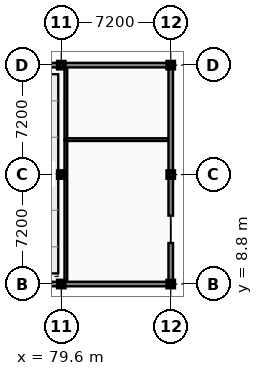
"""IFC4 building model, lengths in metres.
Left out: names, types, materials, properties, quantities, classifications, styles, units other than length and angle.
Written with IfcOpenShell. Run it as: python <this file> out.ifc"""

import sys

from ifc_helpers import new_model, si_unit, direction, frame, frame_2d, origin, origin_2d, place, context, subcontext, project, spatial, rectangle, extrude, element, fill, save


model = new_model("IFC4")
c1 = context("Model", 3, precision=1e-05, world=origin(), true_north=direction((0.0, 1.0)))
c2 = subcontext(c1, "Body", "Model", "MODEL_VIEW")
j1 = project(units=[si_unit("LENGTHUNIT", "METRE"), si_unit("PLANEANGLEUNIT", "RADIAN")], contexts=[c1])
p1 = place(None, origin())
s1 = spatial("IfcSite", under=j1, at=p1, CompositionType="ELEMENT")
p2 = place(p1, origin())
s2 = spatial("IfcBuilding", under=s1, at=p2, CompositionType="ELEMENT")
p3 = place(p2, frame((0.0, 0.0, 9.6)))
s3 = spatial("IfcBuildingStorey", under=s2, at=p3, CompositionType="ELEMENT", Elevation=9.6)
for number, where, z_axis, x_axis in (
    (1, (79.6, 8.8, 0.0), (0.0, 0.0, 1.0), (1.0, 0.0, 0.0)),
    (2, (79.6, 16.0, 0.0), (0.0, 0.0, 1.0), (1.0, 0.0, 0.0)),
    (3, (79.6, 23.2, 0.0), (0.0, 0.0, 1.0), (1.0, 0.0, 0.0)),
    (4, (86.8, 8.8, 0.0), (0.0, 0.0, 1.0), (1.0, 0.0, 0.0)),
    (5, (86.8, 16.0, 0.0), (0.0, 0.0, 1.0), (1.0, 0.0, 0.0)),
    (6, (86.8, 23.2, 0.0), (0.0, 0.0, 1.0), (1.0, 0.0, 0.0)),
):
    element("IfcColumn", number, at=place(p3, frame(where, z_axis=z_axis, x_axis=x_axis)), inside=s3, PredefinedType="COLUMN", context=c2, shape_type="SweptSolid", body=[
        extrude(rectangle(XDim=0.4, YDim=0.4, at=origin_2d()), origin(), (0.0, 0.0, 1.0), 4.2),
    ])
p4 = place(p3, frame((79.9, 8.96, 0.0), z_axis=(0.0, 0.0, 1.0), x_axis=(0.0, 1.0, 0.0)))
e7 = element("IfcWall", 7, at=p4, inside=s3, PredefinedType="PARTITIONING", context=c2, shape_type="SweptSolid", body=[
    extrude(rectangle(XDim=9.34, YDim=0.18, at=frame_2d((4.67, 0.0))), origin(), (0.0, 0.0, 1.0), 3.33),
])
p5 = place(p4, frame((4.17, 0.0, -0.01)))
e8 = element("IfcOpeningElement", 8, at=p5, cuts=e7, PredefinedType="OPENING", context=c2, shape_type="SweptSolid", body=[
    extrude(rectangle(XDim=1.0, YDim=2.16, at=frame_2d((0.5, 1.08))), frame((0.0, 0.1, 0.0), z_axis=(0.0, -1.0, 0.0), x_axis=(1.0, 0.0, 0.0)), (0.0, 0.0, 1.0), 0.2),
])
p6 = place(p3, frame((79.9, 18.3, 0.0), z_axis=(0.0, 0.0, 1.0), x_axis=(0.0, 1.0, 0.0)))
e9 = element("IfcWall", 9, at=p6, inside=s3, PredefinedType="PARTITIONING", context=c2, shape_type="SweptSolid", body=[
    extrude(rectangle(XDim=4.76, YDim=0.18, at=frame_2d((2.38, 0.0))), origin(), (0.0, 0.0, 1.0), 3.33),
])
p7 = place(p6, frame((1.88, 0.0, -0.01)))
e10 = element("IfcOpeningElement", 10, at=p7, cuts=e9, PredefinedType="OPENING", context=c2, shape_type="SweptSolid", body=[
    extrude(rectangle(XDim=1.0, YDim=2.16, at=frame_2d((0.5, 1.08))), frame((0.0, 0.1, 0.0), z_axis=(0.0, -1.0, 0.0), x_axis=(1.0, 0.0, 0.0)), (0.0, 0.0, 1.0), 0.2),
])
p8 = place(p3, frame((79.9, 18.3, 0.0), z_axis=(0.0, 0.0, 1.0), x_axis=(1.0, 0.0, 0.0)))
e11 = element("IfcWall", 11, at=p8, inside=s3, PredefinedType="PARTITIONING", context=c2, shape_type="SweptSolid", body=[
    extrude(rectangle(XDim=6.76, YDim=0.18, at=frame_2d((3.38, 0.0))), origin(), (0.0, 0.0, 1.0), 3.41),
])
p9 = place(p3, frame((76.9, 8.8, 0.0), z_axis=(0.0, 0.0, 1.0), x_axis=(1.0, 0.0, 0.0)))
e12 = element("IfcWall", 12, at=p9, inside=s3, PredefinedType="SOLIDWALL", context=c2, shape_type="SweptSolid", body=[
    extrude(rectangle(XDim=2.7, YDim=0.3, at=frame_2d((1.35, 0.0))), origin(), (0.0, 0.0, 1.0), 3.33),
])
p10 = place(p3, frame((79.6, 8.8, 0.0), z_axis=(0.0, 0.0, 1.0), x_axis=(1.0, 0.0, 0.0)))
e13 = element("IfcWall", 13, at=p10, inside=s3, PredefinedType="SOLIDWALL", context=c2, shape_type="SweptSolid", body=[
    extrude(rectangle(XDim=7.2, YDim=0.3, at=frame_2d((3.6, 0.0))), origin(), (0.0, 0.0, 1.0), 3.33),
])
p11 = place(p10, frame((0.66, 0.0, 0.85)))
e14 = element("IfcOpeningElement", 14, at=p11, cuts=e13, PredefinedType="OPENING", context=c2, shape_type="SweptSolid", body=[
    extrude(rectangle(XDim=0.9, YDim=2.1, at=frame_2d((0.45, 1.05))), frame((0.0, 0.16, 0.0), z_axis=(0.0, -1.0, 0.0), x_axis=(1.0, 0.0, 0.0)), (0.0, 0.0, 1.0), 0.32),
])
p12 = place(p10, frame((5.66, 0.0, 0.85)))
e15 = element("IfcOpeningElement", 15, at=p12, cuts=e13, PredefinedType="OPENING", context=c2, shape_type="SweptSolid", body=[
    extrude(rectangle(XDim=0.9, YDim=2.1, at=frame_2d((0.45, 1.05))), frame((0.0, 0.16, 0.0), z_axis=(0.0, -1.0, 0.0), x_axis=(1.0, 0.0, 0.0)), (0.0, 0.0, 1.0), 0.32),
])
p13 = place(p3, frame((79.6, 23.2, 0.0), z_axis=(0.0, 0.0, 1.0), x_axis=(-1.0, 0.0, 0.0)))
e16 = element("IfcWall", 16, at=p13, inside=s3, PredefinedType="SOLIDWALL", context=c2, shape_type="SweptSolid", body=[
    extrude(rectangle(XDim=2.7, YDim=0.3, at=frame_2d((1.35, 0.0))), origin(), (0.0, 0.0, 1.0), 3.33),
])
p14 = place(p3, frame((86.8, 23.2, 0.0), z_axis=(0.0, 0.0, 1.0), x_axis=(-1.0, 0.0, 0.0)))
e17 = element("IfcWall", 17, at=p14, inside=s3, PredefinedType="SOLIDWALL", context=c2, shape_type="SweptSolid", body=[
    extrude(rectangle(XDim=7.2, YDim=0.3, at=frame_2d((3.6, 0.0))), origin(), (0.0, 0.0, 1.0), 3.33),
])
p15 = place(p14, frame((0.46, 0.0, 0.85)))
e18 = element("IfcOpeningElement", 18, at=p15, cuts=e17, PredefinedType="OPENING", context=c2, shape_type="SweptSolid", body=[
    extrude(rectangle(XDim=0.9, YDim=2.1, at=frame_2d((0.45, 1.05))), frame((0.0, 0.16, 0.0), z_axis=(0.0, -1.0, 0.0), x_axis=(1.0, 0.0, 0.0)), (0.0, 0.0, 1.0), 0.32),
])
p16 = place(p14, frame((5.66, 0.0, 0.85)))
e19 = element("IfcOpeningElement", 19, at=p16, cuts=e17, PredefinedType="OPENING", context=c2, shape_type="SweptSolid", body=[
    extrude(rectangle(XDim=0.9, YDim=2.1, at=frame_2d((0.45, 1.05))), frame((0.0, 0.16, 0.0), z_axis=(0.0, -1.0, 0.0), x_axis=(1.0, 0.0, 0.0)), (0.0, 0.0, 1.0), 0.32),
])
for number, where, z_axis, x_axis in (
    (20, (86.8, 8.8, 0.0), (0.0, 0.0, 1.0), (0.0, 1.0, 0.0)),
    (21, (86.8, 13.3, 0.0), (0.0, 0.0, 1.0), (0.0, 1.0, 0.0)),
):
    element("IfcWall", number, at=place(p3, frame(where, z_axis=z_axis, x_axis=x_axis)), inside=s3, PredefinedType="SOLIDWALL", context=c2, shape_type="SweptSolid", body=[
        extrude(rectangle(XDim=2.7, YDim=0.3, at=frame_2d((1.35, 0.0))), origin(), (0.0, 0.0, 1.0), 3.33),
    ])
p17 = place(p3, frame((86.8, 16.0, 0.0), z_axis=(0.0, 0.0, 1.0), x_axis=(0.0, 1.0, 0.0)))
e22 = element("IfcWall", 22, at=p17, inside=s3, PredefinedType="SOLIDWALL", context=c2, shape_type="SweptSolid", body=[
    extrude(rectangle(XDim=7.2, YDim=0.3, at=frame_2d((3.6, 0.0))), origin(), (0.0, 0.0, 1.0), 3.33),
])
p18 = place(p17, frame((0.46, 0.0, 0.85)))
e23 = element("IfcOpeningElement", 23, at=p18, cuts=e22, PredefinedType="OPENING", context=c2, shape_type="SweptSolid", body=[
    extrude(rectangle(XDim=0.9, YDim=2.1, at=frame_2d((0.45, 1.05))), frame((0.0, 0.16, 0.0), z_axis=(0.0, -1.0, 0.0), x_axis=(1.0, 0.0, 0.0)), (0.0, 0.0, 1.0), 0.32),
])
p19 = place(p17, frame((5.66, 0.0, 0.85)))
e24 = element("IfcOpeningElement", 24, at=p19, cuts=e22, PredefinedType="OPENING", context=c2, shape_type="SweptSolid", body=[
    extrude(rectangle(XDim=0.9, YDim=2.1, at=frame_2d((0.45, 1.05))), frame((0.0, 0.16, 0.0), z_axis=(0.0, -1.0, 0.0), x_axis=(1.0, 0.0, 0.0)), (0.0, 0.0, 1.0), 0.32),
])
p20 = place(p5, frame((1.0, 0.0, 0.01), z_axis=(0.0, 0.0, 1.0), x_axis=(-1.0, 0.0, 0.0)))
e25 = element("IfcDoor", 25, at=p20, inside=s3, OperationType="SINGLE_SWING_LEFT", PredefinedType="DOOR", context=c2, shape_type="SweptSolid", body=[
    extrude(rectangle(XDim=1.0, YDim=2.15, at=frame_2d((0.5, 1.075))), frame((0.0, 0.025, 0.0), z_axis=(0.0, -1.0, 0.0), x_axis=(1.0, 0.0, 0.0)), (0.0, 0.0, 1.0), 0.05),
])
fill(e8, e25)
p21 = place(p7, frame((0.0, 0.0, 0.01)))
e26 = element("IfcDoor", 26, at=p21, inside=s3, OperationType="SINGLE_SWING_RIGHT", PredefinedType="DOOR", context=c2, shape_type="SweptSolid", body=[
    extrude(rectangle(XDim=1.0, YDim=2.15, at=frame_2d((0.5, 1.075))), frame((0.0, 0.025, 0.0), z_axis=(0.0, -1.0, 0.0), x_axis=(1.0, 0.0, 0.0)), (0.0, 0.0, 1.0), 0.05),
])
fill(e10, e26)
p22 = place(p11, origin())
e27 = element("IfcWindow", 27, at=p22, inside=s3, PartitioningType="SINGLE_PANEL", PredefinedType="WINDOW", context=c2, shape_type="SweptSolid", body=[
    extrude(rectangle(XDim=0.9, YDim=2.1, at=frame_2d((0.45, 1.05))), frame((0.0, 0.03, 0.0), z_axis=(0.0, -1.0, 0.0), x_axis=(1.0, 0.0, 0.0)), (0.0, 0.0, 1.0), 0.06),
])
fill(e14, e27)
p23 = place(p12, origin())
e28 = element("IfcWindow", 28, at=p23, inside=s3, PartitioningType="SINGLE_PANEL", PredefinedType="WINDOW", context=c2, shape_type="SweptSolid", body=[
    extrude(rectangle(XDim=0.9, YDim=2.1, at=frame_2d((0.45, 1.05))), frame((0.0, 0.03, 0.0), z_axis=(0.0, -1.0, 0.0), x_axis=(1.0, 0.0, 0.0)), (0.0, 0.0, 1.0), 0.06),
])
fill(e15, e28)
p24 = place(p15, origin())
e29 = element("IfcWindow", 29, at=p24, inside=s3, PartitioningType="SINGLE_PANEL", PredefinedType="WINDOW", context=c2, shape_type="SweptSolid", body=[
    extrude(rectangle(XDim=0.9, YDim=2.1, at=frame_2d((0.45, 1.05))), frame((0.0, 0.03, 0.0), z_axis=(0.0, -1.0, 0.0), x_axis=(1.0, 0.0, 0.0)), (0.0, 0.0, 1.0), 0.06),
])
fill(e18, e29)
p25 = place(p16, origin())
e30 = element("IfcWindow", 30, at=p25, inside=s3, PartitioningType="SINGLE_PANEL", PredefinedType="WINDOW", context=c2, shape_type="SweptSolid", body=[
    extrude(rectangle(XDim=0.9, YDim=2.1, at=frame_2d((0.45, 1.05))), frame((0.0, 0.03, 0.0), z_axis=(0.0, -1.0, 0.0), x_axis=(1.0, 0.0, 0.0)), (0.0, 0.0, 1.0), 0.06),
])
fill(e19, e30)
p26 = place(p18, origin())
e31 = element("IfcWindow", 31, at=p26, inside=s3, PartitioningType="SINGLE_PANEL", PredefinedType="WINDOW", context=c2, shape_type="SweptSolid", body=[
    extrude(rectangle(XDim=0.9, YDim=2.1, at=frame_2d((0.45, 1.05))), frame((0.0, 0.03, 0.0), z_axis=(0.0, -1.0, 0.0), x_axis=(1.0, 0.0, 0.0)), (0.0, 0.0, 1.0), 0.06),
])
fill(e23, e31)
p27 = place(p19, origin())
e32 = element("IfcWindow", 32, at=p27, inside=s3, PartitioningType="SINGLE_PANEL", PredefinedType="WINDOW", context=c2, shape_type="SweptSolid", body=[
    extrude(rectangle(XDim=0.9, YDim=2.1, at=frame_2d((0.45, 1.05))), frame((0.0, 0.03, 0.0), z_axis=(0.0, -1.0, 0.0), x_axis=(1.0, 0.0, 0.0)), (0.0, 0.0, 1.0), 0.06),
])
fill(e24, e32)
save(model, sys.argv[1])
